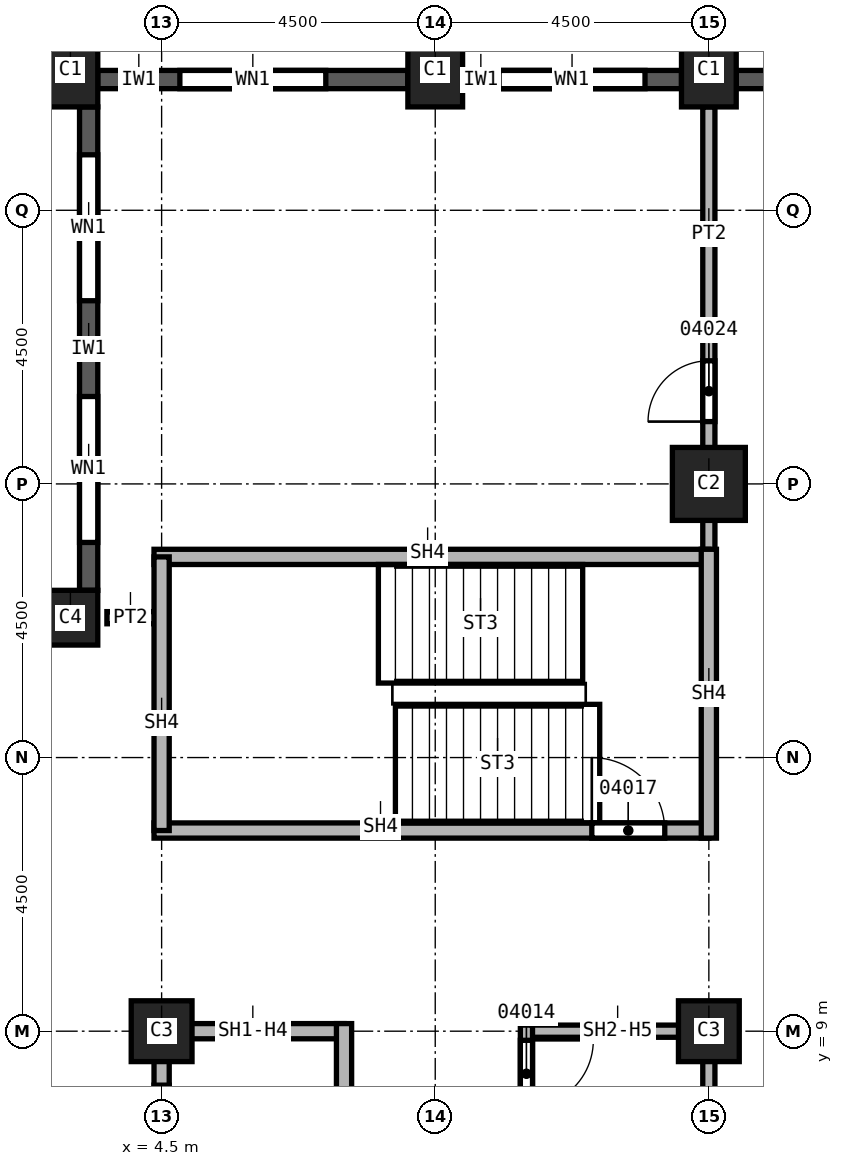
"""IFC4 building model, lengths in metres.
Left out: names, types, materials, properties, quantities, classifications, styles, units other than length and angle.
Written with IfcOpenShell. Run it as: python <this file> out.ifc"""

import sys

from ifc_helpers import new_model, si_unit, direction, frame, frame_2d, origin, origin_2d, place, context, subcontext, project, spatial, rectangle, extrude, element, fill, save


model = new_model("IFC4")
c1 = context("Model", 3, precision=1e-05, world=origin(), true_north=direction((0.0, 1.0)))
c2 = subcontext(c1, "Body", "Model", "MODEL_VIEW")
j1 = project(units=[si_unit("LENGTHUNIT", "METRE"), si_unit("PLANEANGLEUNIT", "RADIAN")], contexts=[c1])
p1 = place(None, origin())
s1 = spatial("IfcSite", under=j1, at=p1, CompositionType="ELEMENT")
p2 = place(p1, origin())
s2 = spatial("IfcBuilding", under=s1, at=p2, CompositionType="ELEMENT")
p3 = place(p2, frame((0.0, 0.0, 104.0)))
s3 = spatial("IfcBuildingStorey", under=s2, at=p3, CompositionType="ELEMENT", Elevation=104.0)
p4 = place(p3, frame((13.5, 18.0, 0.0), z_axis=(0.0, 0.0, 1.0), x_axis=(1.0, 0.0, 0.0)))
e1 = element("IfcColumn", 1, at=p4, inside=s3, PredefinedType="COLUMN", context=c2, shape_type="SweptSolid", body=[
    extrude(rectangle(XDim=1.2, YDim=1.2, at=origin_2d()), origin(), (0.0, 0.0, 1.0), 3.7),
])
for number, where, z_axis, x_axis in (
    (2, (4.5, 9.0, 0.0), (0.0, 0.0, 1.0), (1.0, 0.0, 0.0)),
    (3, (13.5, 9.0, 0.0), (0.0, 0.0, 1.0), (1.0, 0.0, 0.0)),
):
    element("IfcColumn", number, at=place(p3, frame(where, z_axis=z_axis, x_axis=x_axis)), inside=s3, PredefinedType="COLUMN", context=c2, shape_type="SweptSolid", body=[
        extrude(rectangle(XDim=1.0, YDim=1.0, at=origin_2d()), origin(), (0.0, 0.0, 1.0), 3.7),
    ])
for number, where, z_axis, x_axis in (
    (4, (3.0, 24.8, 0.0), (0.0, 0.0, 1.0), (1.0, 0.0, 0.0)),
    (5, (9.0, 24.8, 0.0), (0.0, 0.0, 1.0), (1.0, 0.0, 0.0)),
    (6, (13.5, 24.8, 0.0), (0.0, 0.0, 1.0), (1.0, 0.0, 0.0)),
):
    element("IfcColumn", number, at=place(p3, frame(where, z_axis=z_axis, x_axis=x_axis)), inside=s3, PredefinedType="COLUMN", context=c2, shape_type="SweptSolid", body=[
        extrude(rectangle(XDim=0.9, YDim=1.2, at=origin_2d()), origin(), (0.0, 0.0, 1.0), 3.7),
    ])
p5 = place(p3, frame((3.0, 15.8, 0.0), z_axis=(0.0, 0.0, 1.0), x_axis=(1.0, 0.0, 0.0)))
e7 = element("IfcColumn", 7, at=p5, inside=s3, PredefinedType="COLUMN", context=c2, shape_type="SweptSolid", body=[
    extrude(rectangle(XDim=0.9, YDim=0.9, at=origin_2d()), origin(), (0.0, 0.0, 1.0), 3.7),
])
p6 = place(p3, frame((17.55, 24.65, 0.0), z_axis=(0.0, 0.0, 1.0), x_axis=(-1.0, 0.0, 0.0)))
e8 = element("IfcWall", 8, at=p6, inside=s3, PredefinedType="SOLIDWALL", context=c2, shape_type="SweptSolid", body=[
    extrude(rectangle(XDim=3.6, YDim=0.3, at=frame_2d((1.8, 0.0))), origin(), (0.0, 0.0, 1.0), 3.1),
])
p7 = place(p6, frame((0.775, 0.0, 0.8)))
e9 = element("IfcOpeningElement", 9, at=p7, cuts=e8, PredefinedType="OPENING", context=c2, shape_type="SweptSolid", body=[
    extrude(rectangle(XDim=1.0, YDim=1.95, at=frame_2d((0.5, 0.975))), frame((0.0, 0.15, 0.0), z_axis=(0.0, -1.0, 0.0), x_axis=(1.0, 0.0, 0.0)), (0.0, 0.0, 1.0), 0.3),
])
p8 = place(p6, frame((2.375, 0.0, 0.8)))
e10 = element("IfcOpeningElement", 10, at=p8, cuts=e8, PredefinedType="OPENING", context=c2, shape_type="SweptSolid", body=[
    extrude(rectangle(XDim=0.6, YDim=1.95, at=frame_2d((0.3, 0.975))), frame((0.0, 0.15, 0.0), z_axis=(0.0, -1.0, 0.0), x_axis=(1.0, 0.0, 0.0)), (0.0, 0.0, 1.0), 0.3),
])
p9 = place(p3, frame((13.05, 24.65, 0.0), z_axis=(0.0, 0.0, 1.0), x_axis=(-1.0, 0.0, 0.0)))
e11 = element("IfcWall", 11, at=p9, inside=s3, PredefinedType="SOLIDWALL", context=c2, shape_type="SweptSolid", body=[
    extrude(rectangle(XDim=3.6, YDim=0.3, at=frame_2d((1.8, 0.0))), origin(), (0.0, 0.0, 1.0), 3.1),
])
p10 = place(p9, frame((0.6, 0.0, 0.8)))
e12 = element("IfcOpeningElement", 12, at=p10, cuts=e11, PredefinedType="OPENING", context=c2, shape_type="SweptSolid", body=[
    extrude(rectangle(XDim=2.4, YDim=1.95, at=frame_2d((1.2, 0.975))), frame((0.0, 0.15, 0.0), z_axis=(0.0, -1.0, 0.0), x_axis=(1.0, 0.0, 0.0)), (0.0, 0.0, 1.0), 0.3),
])
p11 = place(p3, frame((8.55, 24.65, 0.0), z_axis=(0.0, 0.0, 1.0), x_axis=(-1.0, 0.0, 0.0)))
e13 = element("IfcWall", 13, at=p11, inside=s3, PredefinedType="SOLIDWALL", context=c2, shape_type="SweptSolid", body=[
    extrude(rectangle(XDim=5.1, YDim=0.3, at=frame_2d((2.55, 0.0))), origin(), (0.0, 0.0, 1.0), 3.1),
])
p12 = place(p11, frame((1.35, 0.0, 0.8)))
e14 = element("IfcOpeningElement", 14, at=p12, cuts=e13, PredefinedType="OPENING", context=c2, shape_type="SweptSolid", body=[
    extrude(rectangle(XDim=2.4, YDim=1.95, at=frame_2d((1.2, 0.975))), frame((0.0, 0.15, 0.0), z_axis=(0.0, -1.0, 0.0), x_axis=(1.0, 0.0, 0.0)), (0.0, 0.0, 1.0), 0.3),
])
p13 = place(p3, frame((3.3, 24.2, 0.0), z_axis=(0.0, 0.0, 1.0), x_axis=(0.0, -1.0, 0.0)))
e15 = element("IfcWall", 15, at=p13, inside=s3, PredefinedType="SOLIDWALL", context=c2, shape_type="SweptSolid", body=[
    extrude(rectangle(XDim=7.95, YDim=0.3, at=frame_2d((3.975, 0.0))), origin(), (0.0, 0.0, 1.0), 3.1),
])
p14 = place(p13, frame((0.788, 0.0, 0.8)))
e16 = element("IfcOpeningElement", 16, at=p14, cuts=e15, PredefinedType="OPENING", context=c2, shape_type="SweptSolid", body=[
    extrude(rectangle(XDim=2.4, YDim=1.95, at=frame_2d((1.2, 0.975))), frame((0.0, 0.15, 0.0), z_axis=(0.0, -1.0, 0.0), x_axis=(1.0, 0.0, 0.0)), (0.0, 0.0, 1.0), 0.3),
])
p15 = place(p13, frame((4.762, 0.0, 0.8)))
e17 = element("IfcOpeningElement", 17, at=p15, cuts=e15, PredefinedType="OPENING", context=c2, shape_type="SweptSolid", body=[
    extrude(rectangle(XDim=2.4, YDim=1.95, at=frame_2d((1.2, 0.975))), frame((0.0, 0.15, 0.0), z_axis=(0.0, -1.0, 0.0), x_axis=(1.0, 0.0, 0.0)), (0.0, 0.0, 1.0), 0.3),
])
p16 = place(p3, frame((3.6, 15.8, 0.0), z_axis=(0.0, 0.0, 1.0), x_axis=(1.0, 0.0, 0.0)))
e18 = element("IfcWall", 18, at=p16, inside=s3, PredefinedType="PARTITIONING", context=c2, shape_type="SweptSolid", body=[
    extrude(rectangle(XDim=0.9, YDim=0.2, at=frame_2d((0.45, 0.0))), origin(), (0.0, 0.0, 1.0), 3.7),
])
p17 = place(p3, frame((13.5, 16.675, 0.0), z_axis=(0.0, 0.0, 1.0), x_axis=(0.0, 1.0, 0.0)))
e19 = element("IfcWall", 19, at=p17, inside=s3, PredefinedType="PARTITIONING", context=c2, shape_type="SweptSolid", body=[
    extrude(rectangle(XDim=7.525, YDim=0.2, at=frame_2d((3.762, 0.0))), origin(), (0.0, 0.0, 1.0), 3.7),
])
p18 = place(p17, frame((2.35, 0.0, 0.0)))
e20 = element("IfcOpeningElement", 20, at=p18, cuts=e19, PredefinedType="OPENING", context=c2, shape_type="SweptSolid", body=[
    extrude(rectangle(XDim=1.0, YDim=2.1, at=frame_2d((0.5, 1.05))), frame((0.0, 0.1, 0.0), z_axis=(0.0, -1.0, 0.0), x_axis=(1.0, 0.0, 0.0)), (0.0, 0.0, 1.0), 0.2),
])
p19 = place(p3, frame((10.5, 9.0, 0.0), z_axis=(0.0, 0.0, 1.0), x_axis=(1.0, 0.0, 0.0)))
e21 = element("IfcWall", 21, at=p19, inside=s3, PredefinedType="SOLIDWALL", context=c2, shape_type="SweptSolid", body=[
    extrude(rectangle(XDim=3.0, YDim=0.2, at=frame_2d((1.5, 0.0))), origin(), (0.0, 0.0, 1.0), 2.938),
])
p20 = place(p3, frame((10.5, 9.1, 0.0), z_axis=(0.0, 0.0, 1.0), x_axis=(0.0, -1.0, 0.0)))
e22 = element("IfcWall", 22, at=p20, inside=s3, PredefinedType="SOLIDWALL", context=c2, shape_type="SweptSolid", body=[
    extrude(rectangle(XDim=3.225, YDim=0.2, at=frame_2d((1.613, 0.0))), origin(), (0.0, 0.0, 1.0), 3.7),
])
p21 = place(p20, frame((0.25, 0.0, 0.0)))
e23 = element("IfcOpeningElement", 23, at=p21, cuts=e22, PredefinedType="OPENING", context=c2, shape_type="SweptSolid", body=[
    extrude(rectangle(XDim=1.1, YDim=2.1, at=frame_2d((0.55, 1.05))), frame((0.0, 0.1, 0.0), z_axis=(0.0, -1.0, 0.0), x_axis=(1.0, 0.0, 0.0)), (0.0, 0.0, 1.0), 0.2),
])
p22 = place(p3, frame((13.5, 9.1, 0.0), z_axis=(0.0, 0.0, 1.0), x_axis=(0.0, -1.0, 0.0)))
e24 = element("IfcWall", 24, at=p22, inside=s3, PredefinedType="SOLIDWALL", context=c2, shape_type="SweptSolid", body=[
    extrude(rectangle(XDim=3.1, YDim=0.2, at=frame_2d((1.55, 0.0))), origin(), (0.0, 0.0, 1.0), 2.938),
])
p23 = place(p3, frame((4.5, 0.0, 0.0), z_axis=(0.0, 0.0, 1.0), x_axis=(0.0, 1.0, 0.0)))
e25 = element("IfcWall", 25, at=p23, inside=s3, PredefinedType="SOLIDWALL", context=c2, shape_type="SweptSolid", body=[
    extrude(rectangle(XDim=9.125, YDim=0.25, at=frame_2d((4.562, 0.0))), origin(), (0.0, 0.0, 1.0), 2.938),
])
p24 = place(p23, frame((0.95, 0.0, 0.0)))
e26 = element("IfcOpeningElement", 26, at=p24, cuts=e25, PredefinedType="OPENING", context=c2, shape_type="SweptSolid", body=[
    extrude(rectangle(XDim=1.1, YDim=2.1, at=frame_2d((0.55, 1.05))), frame((0.0, 0.125, 0.0), z_axis=(0.0, -1.0, 0.0), x_axis=(1.0, 0.0, 0.0)), (0.0, 0.0, 1.0), 0.25),
])
p25 = place(p23, frame((3.95, 0.0, 0.0)))
e27 = element("IfcOpeningElement", 27, at=p25, cuts=e25, PredefinedType="OPENING", context=c2, shape_type="SweptSolid", body=[
    extrude(rectangle(XDim=1.1, YDim=2.1, at=frame_2d((0.55, 1.05))), frame((0.0, 0.125, 0.0), z_axis=(0.0, -1.0, 0.0), x_axis=(1.0, 0.0, 0.0)), (0.0, 0.0, 1.0), 0.25),
])
p26 = place(p23, frame((7.012, 0.0, 0.0)))
e28 = element("IfcOpeningElement", 28, at=p26, cuts=e25, PredefinedType="OPENING", context=c2, shape_type="SweptSolid", body=[
    extrude(rectangle(XDim=1.1, YDim=2.1, at=frame_2d((0.55, 1.05))), frame((0.0, 0.125, 0.0), z_axis=(0.0, -1.0, 0.0), x_axis=(1.0, 0.0, 0.0)), (0.0, 0.0, 1.0), 0.25),
])
p27 = place(p3, frame((4.5, 9.0, 0.0), z_axis=(0.0, 0.0, 1.0), x_axis=(1.0, 0.0, 0.0)))
e29 = element("IfcWall", 29, at=p27, inside=s3, PredefinedType="SOLIDWALL", context=c2, shape_type="SweptSolid", body=[
    extrude(rectangle(XDim=3.0, YDim=0.25, at=frame_2d((1.5, 0.0))), origin(), (0.0, 0.0, 1.0), 2.938),
])
p28 = place(p3, frame((7.5, 9.125, 0.0), z_axis=(0.0, 0.0, 1.0), x_axis=(0.0, -1.0, 0.0)))
e30 = element("IfcWall", 30, at=p28, inside=s3, PredefinedType="SOLIDWALL", context=c2, shape_type="SweptSolid", body=[
    extrude(rectangle(XDim=12.25, YDim=0.25, at=frame_2d((6.125, 0.0))), origin(), (0.0, 0.0, 1.0), 3.7),
])
p29 = place(p3, frame((4.375, 12.3, 0.0), z_axis=(0.0, 0.0, 1.0), x_axis=(1.0, 0.0, 0.0)))
e31 = element("IfcWall", 31, at=p29, inside=s3, PredefinedType="SOLIDWALL", context=c2, shape_type="SweptSolid", body=[
    extrude(rectangle(XDim=9.125, YDim=0.25, at=frame_2d((4.562, 0.0))), origin(), (0.0, 0.0, 1.0), 3.7),
])
p30 = place(p29, frame((7.2, 0.0, 0.0)))
e32 = element("IfcOpeningElement", 32, at=p30, cuts=e31, PredefinedType="OPENING", context=c2, shape_type="SweptSolid", body=[
    extrude(rectangle(XDim=1.2, YDim=2.1, at=frame_2d((0.6, 1.05))), frame((0.0, 0.125, 0.0), z_axis=(0.0, -1.0, 0.0), x_axis=(1.0, 0.0, 0.0)), (0.0, 0.0, 1.0), 0.25),
])
p31 = place(p3, frame((4.375, 16.8, 0.0), z_axis=(0.0, 0.0, 1.0), x_axis=(1.0, 0.0, 0.0)))
e33 = element("IfcWall", 33, at=p31, inside=s3, PredefinedType="SOLIDWALL", context=c2, shape_type="SweptSolid", body=[
    extrude(rectangle(XDim=9.125, YDim=0.25, at=frame_2d((4.562, 0.0))), origin(), (0.0, 0.0, 1.0), 3.7),
])
p32 = place(p3, frame((4.5, 12.3, 0.0), z_axis=(0.0, 0.0, 1.0), x_axis=(0.0, 1.0, 0.0)))
e34 = element("IfcWall", 34, at=p32, inside=s3, PredefinedType="SOLIDWALL", context=c2, shape_type="SweptSolid", body=[
    extrude(rectangle(XDim=4.5, YDim=0.25, at=frame_2d((2.25, 0.0))), origin(), (0.0, 0.0, 1.0), 3.7),
])
p33 = place(p3, frame((13.5, 12.175, 0.0), z_axis=(0.0, 0.0, 1.0), x_axis=(0.0, 1.0, 0.0)))
e35 = element("IfcWall", 35, at=p33, inside=s3, PredefinedType="SOLIDWALL", context=c2, shape_type="SweptSolid", body=[
    extrude(rectangle(XDim=4.75, YDim=0.25, at=frame_2d((2.375, 0.0))), origin(), (0.0, 0.0, 1.0), 3.7),
])
p34 = place(p10, origin())
e36 = element("IfcWindow", 36, at=p34, inside=s3, PartitioningType="SINGLE_PANEL", PredefinedType="WINDOW", context=c2, shape_type="SweptSolid", body=[
    extrude(rectangle(XDim=2.4, YDim=1.95, at=frame_2d((1.2, 0.975))), frame((0.0, 0.03, 0.0), z_axis=(0.0, -1.0, 0.0), x_axis=(1.0, 0.0, 0.0)), (0.0, 0.0, 1.0), 0.06),
])
fill(e12, e36)
p35 = place(p12, origin())
e37 = element("IfcWindow", 37, at=p35, inside=s3, PartitioningType="SINGLE_PANEL", PredefinedType="WINDOW", context=c2, shape_type="SweptSolid", body=[
    extrude(rectangle(XDim=2.4, YDim=1.95, at=frame_2d((1.2, 0.975))), frame((0.0, 0.03, 0.0), z_axis=(0.0, -1.0, 0.0), x_axis=(1.0, 0.0, 0.0)), (0.0, 0.0, 1.0), 0.06),
])
fill(e14, e37)
p36 = place(p14, origin())
e38 = element("IfcWindow", 38, at=p36, inside=s3, PartitioningType="SINGLE_PANEL", PredefinedType="WINDOW", context=c2, shape_type="SweptSolid", body=[
    extrude(rectangle(XDim=2.4, YDim=1.95, at=frame_2d((1.2, 0.975))), frame((0.0, 0.03, 0.0), z_axis=(0.0, -1.0, 0.0), x_axis=(1.0, 0.0, 0.0)), (0.0, 0.0, 1.0), 0.06),
])
fill(e16, e38)
p37 = place(p15, origin())
e39 = element("IfcWindow", 39, at=p37, inside=s3, PartitioningType="SINGLE_PANEL", PredefinedType="WINDOW", context=c2, shape_type="SweptSolid", body=[
    extrude(rectangle(XDim=2.4, YDim=1.95, at=frame_2d((1.2, 0.975))), frame((0.0, 0.03, 0.0), z_axis=(0.0, -1.0, 0.0), x_axis=(1.0, 0.0, 0.0)), (0.0, 0.0, 1.0), 0.06),
])
fill(e17, e39)
p38 = place(p21, origin())
e40 = element("IfcDoor", 40, at=p38, inside=s3, OperationType="SINGLE_SWING_LEFT", PredefinedType="DOOR", context=c2, shape_type="SweptSolid", body=[
    extrude(rectangle(XDim=1.1, YDim=2.1, at=frame_2d((0.55, 1.05))), frame((0.0, 0.025, 0.0), z_axis=(0.0, -1.0, 0.0), x_axis=(1.0, 0.0, 0.0)), (0.0, 0.0, 1.0), 0.05),
])
fill(e23, e40)
p39 = place(p30, origin())
e41 = element("IfcDoor", 41, at=p39, inside=s3, OperationType="SINGLE_SWING_RIGHT", PredefinedType="DOOR", context=c2, shape_type="SweptSolid", body=[
    extrude(rectangle(XDim=1.2, YDim=2.1, at=frame_2d((0.6, 1.05))), frame((0.0, 0.025, 0.0), z_axis=(0.0, -1.0, 0.0), x_axis=(1.0, 0.0, 0.0)), (0.0, 0.0, 1.0), 0.05),
])
fill(e32, e41)
p40 = place(p18, origin())
e42 = element("IfcDoor", 42, at=p40, inside=s3, OperationType="SINGLE_SWING_LEFT", PredefinedType="DOOR", context=c2, shape_type="SweptSolid", body=[
    extrude(rectangle(XDim=1.0, YDim=2.1, at=frame_2d((0.5, 1.05))), frame((0.0, 0.025, 0.0), z_axis=(0.0, -1.0, 0.0), x_axis=(1.0, 0.0, 0.0)), (0.0, 0.0, 1.0), 0.05),
])
fill(e20, e42)
p41 = place(p26, origin())
e43 = element("IfcDoor", 43, at=p41, inside=s3, OperationType="SLIDING_TO_LEFT", PredefinedType="DOOR", context=c2, shape_type="SweptSolid", body=[
    extrude(rectangle(XDim=1.1, YDim=2.1, at=frame_2d((0.55, 1.05))), frame((0.0, 0.025, 0.0), z_axis=(0.0, -1.0, 0.0), x_axis=(1.0, 0.0, 0.0)), (0.0, 0.0, 1.0), 0.05),
])
fill(e28, e43)
save(model, sys.argv[1])
